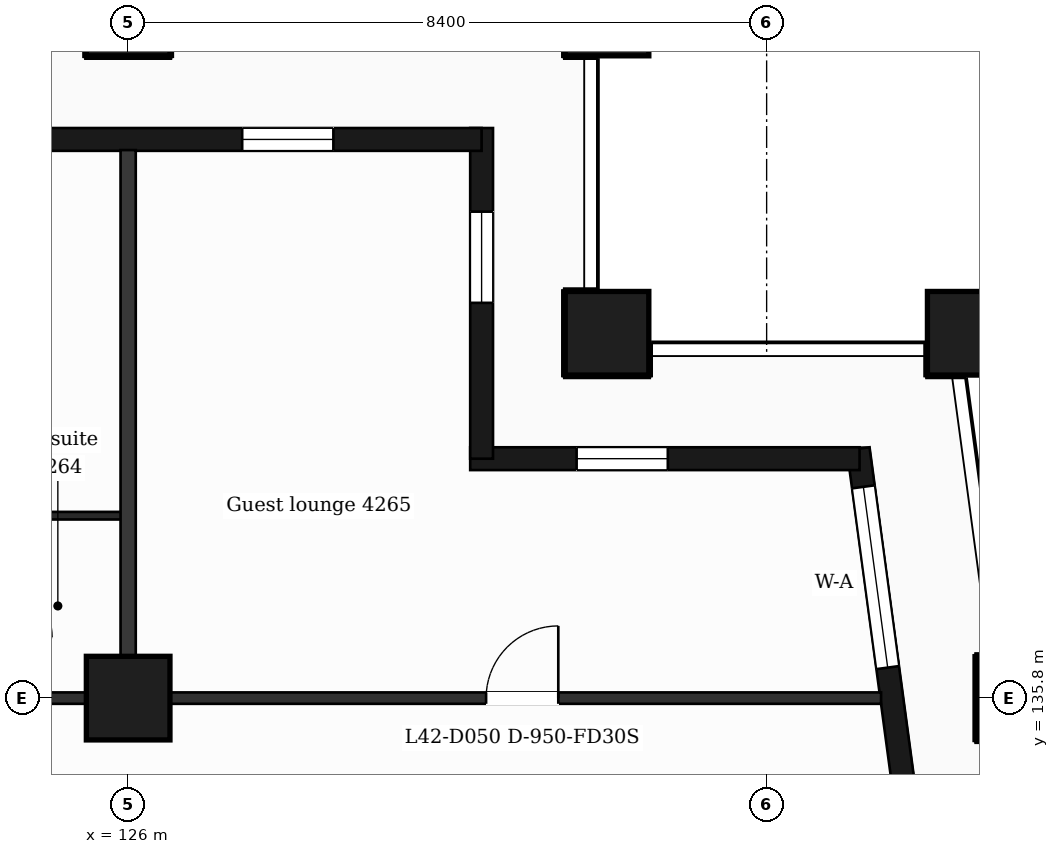
"""IFC4 building model, lengths in metres.
Left out: names, types, materials, properties, quantities, classifications, styles, units other than length and angle.
Written with IfcOpenShell. Run it as: python <this file> out.ifc"""

import sys

from ifc_helpers import new_model, si_unit, direction, frame, frame_2d, origin, origin_2d, place, context, subcontext, project, spatial, rectangle, extrude, element, fill, save


model = new_model("IFC4")
c1 = context("Model", 3, precision=1e-05, world=origin(), true_north=direction((0.0, 1.0)))
c2 = subcontext(c1, "Body", "Model", "MODEL_VIEW")
j1 = project(units=[si_unit("LENGTHUNIT", "METRE"), si_unit("PLANEANGLEUNIT", "RADIAN")], contexts=[c1])
p1 = place(None, origin())
s1 = spatial("IfcSite", under=j1, at=p1, CompositionType="ELEMENT")
p2 = place(p1, origin())
s2 = spatial("IfcBuilding", under=s1, at=p2, CompositionType="ELEMENT")
p3 = place(p2, frame((0.0, 0.0, 177.4)))
s3 = spatial("IfcBuildingStorey", under=s2, at=p3, CompositionType="ELEMENT", Elevation=177.4)
for number, where, z_axis, x_axis in (
    (1, (132.3, 140.6, 0.0), (0.0, 0.0, 1.0), (1.0, 0.0, 0.0)),
    (2, (137.065, 140.6, 0.0), (0.0, 0.0, 1.0), (1.0, 0.0, 0.0)),
    (3, (126.0, 135.8, 0.0), (0.0, 0.0, 1.0), (1.0, 0.0, 0.0)),
    (4, (137.711, 135.8, 0.0), (0.0, 0.0, 1.0), (1.0, 0.0, 0.0)),
    (5, (126.0, 144.8, 0.0), (0.0, 0.0, 1.0), (1.0, 0.0, 0.0)),
    (6, (132.3, 144.8, 0.0), (0.0, 0.0, 1.0), (1.0, 0.0, 0.0)),
):
    element("IfcColumn", number, at=place(p3, frame(where, z_axis=z_axis, x_axis=x_axis)), inside=s3, PredefinedType="COLUMN", context=c2, shape_type="SweptSolid", body=[
        extrude(rectangle(XDim=1.1, YDim=1.1, at=origin_2d()), origin(), (0.0, 0.0, 1.0), 3.7),
    ])
p4 = place(p3, frame((136.504, 132.4, 0.0), z_axis=(0.0, 0.0, 1.0), x_axis=(-0.133399697462, 0.99106231929, 0.0)))
e7 = element("IfcWall", 7, at=p4, inside=s3, PredefinedType="SOLIDWALL", context=c2, shape_type="SweptSolid", body=[
    extrude(rectangle(XDim=6.74, YDim=0.3, at=frame_2d((3.37, 0.0))), origin(), (0.0, 0.0, 1.0), 3.38),
])
p5 = place(p4, frame((1.115, 0.0, 0.0)))
e8 = element("IfcOpeningElement", 8, at=p5, cuts=e7, PredefinedType="OPENING", context=c2, shape_type="SweptSolid", body=[
    extrude(rectangle(XDim=1.2, YDim=2.4, at=frame_2d((0.6, 1.2))), frame((0.0, 0.16, 0.0), z_axis=(0.0, -1.0, 0.0), x_axis=(1.0, 0.0, 0.0)), (0.0, 0.0, 1.0), 0.32),
])
p6 = place(p4, frame((3.835, 0.0, 0.9)))
e9 = element("IfcOpeningElement", 9, at=p6, cuts=e7, PredefinedType="OPENING", context=c2, shape_type="SweptSolid", body=[
    extrude(rectangle(XDim=2.4, YDim=2.1, at=frame_2d((1.2, 1.05))), frame((0.0, 0.16, 0.0), z_axis=(0.0, -1.0, 0.0), x_axis=(1.0, 0.0, 0.0)), (0.0, 0.0, 1.0), 0.32),
])
p7 = place(p3, frame((135.623, 138.95, 0.0), z_axis=(0.0, 0.0, 1.0), x_axis=(-1.0, 0.0, 0.0)))
e10 = element("IfcWall", 10, at=p7, inside=s3, PredefinedType="SOLIDWALL", context=c2, shape_type="SweptSolid", body=[
    extrude(rectangle(XDim=5.123, YDim=0.3, at=frame_2d((2.561, 0.0))), origin(), (0.0, 0.0, 1.0), 3.38),
])
p8 = place(p7, frame((2.523, 0.0, 0.9)))
e11 = element("IfcOpeningElement", 11, at=p8, cuts=e10, PredefinedType="OPENING", context=c2, shape_type="SweptSolid", body=[
    extrude(rectangle(XDim=1.2, YDim=2.1, at=frame_2d((0.6, 1.05))), frame((0.0, 0.16, 0.0), z_axis=(0.0, -1.0, 0.0), x_axis=(1.0, 0.0, 0.0)), (0.0, 0.0, 1.0), 0.32),
])
p9 = place(p3, frame((130.65, 138.95, 0.0), z_axis=(0.0, 0.0, 1.0), x_axis=(0.0, 1.0, 0.0)))
e12 = element("IfcWall", 12, at=p9, inside=s3, PredefinedType="SOLIDWALL", context=c2, shape_type="SweptSolid", body=[
    extrude(rectangle(XDim=4.35, YDim=0.3, at=frame_2d((2.175, 0.0))), origin(), (0.0, 0.0, 1.0), 3.38),
])
p10 = place(p9, frame((2.05, 0.0, 0.9)))
e13 = element("IfcOpeningElement", 13, at=p10, cuts=e12, PredefinedType="OPENING", context=c2, shape_type="SweptSolid", body=[
    extrude(rectangle(XDim=1.2, YDim=2.1, at=frame_2d((0.6, 1.05))), frame((0.0, 0.16, 0.0), z_axis=(0.0, -1.0, 0.0), x_axis=(1.0, 0.0, 0.0)), (0.0, 0.0, 1.0), 0.32),
])
p11 = place(p3, frame((130.65, 143.15, 0.0), z_axis=(0.0, 0.0, 1.0), x_axis=(-1.0, 0.0, 0.0)))
e14 = element("IfcWall", 14, at=p11, inside=s3, PredefinedType="SOLIDWALL", context=c2, shape_type="SweptSolid", body=[
    extrude(rectangle(XDim=16.35, YDim=0.3, at=frame_2d((8.175, 0.0))), origin(), (0.0, 0.0, 1.0), 3.38),
])
p12 = place(p11, frame((1.95, 0.0, 0.9)))
e15 = element("IfcOpeningElement", 15, at=p12, cuts=e14, PredefinedType="OPENING", context=c2, shape_type="SweptSolid", body=[
    extrude(rectangle(XDim=1.2, YDim=2.1, at=frame_2d((0.6, 1.05))), frame((0.0, 0.16, 0.0), z_axis=(0.0, -1.0, 0.0), x_axis=(1.0, 0.0, 0.0)), (0.0, 0.0, 1.0), 0.32),
])
p13 = place(p11, frame((6.15, 0.0, 0.0)))
e16 = element("IfcOpeningElement", 16, at=p13, cuts=e14, PredefinedType="OPENING", context=c2, shape_type="SweptSolid", body=[
    extrude(rectangle(XDim=1.2, YDim=2.4, at=frame_2d((0.6, 1.2))), frame((0.0, 0.16, 0.0), z_axis=(0.0, -1.0, 0.0), x_axis=(1.0, 0.0, 0.0)), (0.0, 0.0, 1.0), 0.32),
])
p14 = place(p11, frame((9.75, 0.0, 0.9)))
e17 = element("IfcOpeningElement", 17, at=p14, cuts=e14, PredefinedType="OPENING", context=c2, shape_type="SweptSolid", body=[
    extrude(rectangle(XDim=2.4, YDim=2.1, at=frame_2d((1.2, 1.05))), frame((0.0, 0.16, 0.0), z_axis=(0.0, -1.0, 0.0), x_axis=(1.0, 0.0, 0.0)), (0.0, 0.0, 1.0), 0.32),
])
p15 = place(p11, frame((13.45, 0.0, 0.9)))
e18 = element("IfcOpeningElement", 18, at=p15, cuts=e14, PredefinedType="OPENING", context=c2, shape_type="SweptSolid", body=[
    extrude(rectangle(XDim=2.4, YDim=2.1, at=frame_2d((1.2, 1.05))), frame((0.0, 0.16, 0.0), z_axis=(0.0, -1.0, 0.0), x_axis=(1.0, 0.0, 0.0)), (0.0, 0.0, 1.0), 0.32),
])
p16 = place(p3, frame((90.895, 135.8, 0.0), z_axis=(0.0, 0.0, 1.0), x_axis=(1.0, 0.0, 0.0)))
e19 = element("IfcWall", 19, at=p16, inside=s3, PredefinedType="PARTITIONING", context=c2, shape_type="SweptSolid", body=[
    extrude(rectangle(XDim=45.011, YDim=0.15, at=frame_2d((22.505, 0.0))), origin(), (0.0, 0.0, 1.0), 3.38),
])
p17 = place(p16, frame((6.906, 0.0, 0.0)))
e20 = element("IfcOpeningElement", 20, at=p17, cuts=e19, PredefinedType="OPENING", context=c2, shape_type="SweptSolid", body=[
    extrude(rectangle(XDim=1.0, YDim=2.1, at=frame_2d((0.5, 1.05))), frame((0.0, 0.085, 0.0), z_axis=(0.0, -1.0, 0.0), x_axis=(1.0, 0.0, 0.0)), (0.0, 0.0, 1.0), 0.17),
])
p18 = place(p16, frame((11.875, 0.0, 0.0)))
e21 = element("IfcOpeningElement", 21, at=p18, cuts=e19, PredefinedType="OPENING", context=c2, shape_type="SweptSolid", body=[
    extrude(rectangle(XDim=0.95, YDim=2.1, at=frame_2d((0.475, 1.05))), frame((0.0, 0.085, 0.0), z_axis=(0.0, -1.0, 0.0), x_axis=(1.0, 0.0, 0.0)), (0.0, 0.0, 1.0), 0.17),
])
p19 = place(p16, frame((19.292, 0.0, 0.0)))
e22 = element("IfcOpeningElement", 22, at=p19, cuts=e19, PredefinedType="OPENING", context=c2, shape_type="SweptSolid", body=[
    extrude(rectangle(XDim=0.95, YDim=2.1, at=frame_2d((0.475, 1.05))), frame((0.0, 0.085, 0.0), z_axis=(0.0, -1.0, 0.0), x_axis=(1.0, 0.0, 0.0)), (0.0, 0.0, 1.0), 0.17),
])
p20 = place(p16, frame((23.418, 0.0, 0.0)))
e23 = element("IfcOpeningElement", 23, at=p20, cuts=e19, PredefinedType="OPENING", context=c2, shape_type="SweptSolid", body=[
    extrude(rectangle(XDim=0.95, YDim=2.1, at=frame_2d((0.475, 1.05))), frame((0.0, 0.085, 0.0), z_axis=(0.0, -1.0, 0.0), x_axis=(1.0, 0.0, 0.0)), (0.0, 0.0, 1.0), 0.17),
])
p21 = place(p16, frame((29.425, 0.0, 0.0)))
e24 = element("IfcOpeningElement", 24, at=p21, cuts=e19, PredefinedType="OPENING", context=c2, shape_type="SweptSolid", body=[
    extrude(rectangle(XDim=0.95, YDim=2.1, at=frame_2d((0.475, 1.05))), frame((0.0, 0.085, 0.0), z_axis=(0.0, -1.0, 0.0), x_axis=(1.0, 0.0, 0.0)), (0.0, 0.0, 1.0), 0.17),
])
p22 = place(p16, frame((31.63, 0.0, 0.0)))
e25 = element("IfcOpeningElement", 25, at=p22, cuts=e19, PredefinedType="OPENING", context=c2, shape_type="SweptSolid", body=[
    extrude(rectangle(XDim=0.95, YDim=2.1, at=frame_2d((0.475, 1.05))), frame((0.0, 0.085, 0.0), z_axis=(0.0, -1.0, 0.0), x_axis=(1.0, 0.0, 0.0)), (0.0, 0.0, 1.0), 0.17),
])
p23 = place(p16, frame((39.814, 0.0, 0.0)))
e26 = element("IfcOpeningElement", 26, at=p23, cuts=e19, PredefinedType="OPENING", context=c2, shape_type="SweptSolid", body=[
    extrude(rectangle(XDim=0.95, YDim=2.1, at=frame_2d((0.475, 1.05))), frame((0.0, 0.085, 0.0), z_axis=(0.0, -1.0, 0.0), x_axis=(1.0, 0.0, 0.0)), (0.0, 0.0, 1.0), 0.17),
])
p24 = place(p3, frame((124.15, 138.2, 0.0), z_axis=(0.0, 0.0, 1.0), x_axis=(1.0, 0.0, 0.0)))
e27 = element("IfcWall", 27, at=p24, inside=s3, PredefinedType="PARTITIONING", context=c2, shape_type="SweptSolid", body=[
    extrude(rectangle(XDim=1.85, YDim=0.1, at=frame_2d((0.925, 0.0))), origin(), (0.0, 0.0, 1.0), 3.38),
])
p25 = place(p3, frame((126.0, 135.875, 0.0), z_axis=(0.0, 0.0, 1.0), x_axis=(0.0, 1.0, 0.0)))
e28 = element("IfcWall", 28, at=p25, inside=s3, PredefinedType="PARTITIONING", context=c2, shape_type="SweptSolid", body=[
    extrude(rectangle(XDim=7.135, YDim=0.2, at=frame_2d((3.567, 0.0))), origin(), (0.0, 0.0, 1.0), 3.38),
])
p26 = place(p6, origin())
e29 = element("IfcWindow", 29, at=p26, inside=s3, PartitioningType="SINGLE_PANEL", PredefinedType="WINDOW", context=c2, shape_type="SweptSolid", body=[
    extrude(rectangle(XDim=2.4, YDim=2.1, at=frame_2d((1.2, 1.05))), frame((0.0, 0.03, 0.0), z_axis=(0.0, -1.0, 0.0), x_axis=(1.0, 0.0, 0.0)), (0.0, 0.0, 1.0), 0.06),
])
fill(e9, e29)
p27 = place(p8, origin())
e30 = element("IfcWindow", 30, at=p27, inside=s3, PartitioningType="SINGLE_PANEL", PredefinedType="WINDOW", context=c2, shape_type="SweptSolid", body=[
    extrude(rectangle(XDim=1.2, YDim=2.1, at=frame_2d((0.6, 1.05))), frame((0.0, 0.03, 0.0), z_axis=(0.0, -1.0, 0.0), x_axis=(1.0, 0.0, 0.0)), (0.0, 0.0, 1.0), 0.06),
])
fill(e11, e30)
p28 = place(p10, origin())
e31 = element("IfcWindow", 31, at=p28, inside=s3, PartitioningType="SINGLE_PANEL", PredefinedType="WINDOW", context=c2, shape_type="SweptSolid", body=[
    extrude(rectangle(XDim=1.2, YDim=2.1, at=frame_2d((0.6, 1.05))), frame((0.0, 0.03, 0.0), z_axis=(0.0, -1.0, 0.0), x_axis=(1.0, 0.0, 0.0)), (0.0, 0.0, 1.0), 0.06),
])
fill(e13, e31)
p29 = place(p12, origin())
e32 = element("IfcWindow", 32, at=p29, inside=s3, PartitioningType="SINGLE_PANEL", PredefinedType="WINDOW", context=c2, shape_type="SweptSolid", body=[
    extrude(rectangle(XDim=1.2, YDim=2.1, at=frame_2d((0.6, 1.05))), frame((0.0, 0.03, 0.0), z_axis=(0.0, -1.0, 0.0), x_axis=(1.0, 0.0, 0.0)), (0.0, 0.0, 1.0), 0.06),
])
fill(e15, e32)
p30 = place(p23, origin())
e33 = element("IfcDoor", 33, at=p30, inside=s3, OperationType="SINGLE_SWING_RIGHT", PredefinedType="DOOR", context=c2, shape_type="SweptSolid", body=[
    extrude(rectangle(XDim=0.95, YDim=2.1, at=frame_2d((0.475, 1.05))), frame((0.0, 0.025, 0.0), z_axis=(0.0, -1.0, 0.0), x_axis=(1.0, 0.0, 0.0)), (0.0, 0.0, 1.0), 0.05),
])
fill(e26, e33)
save(model, sys.argv[1])
